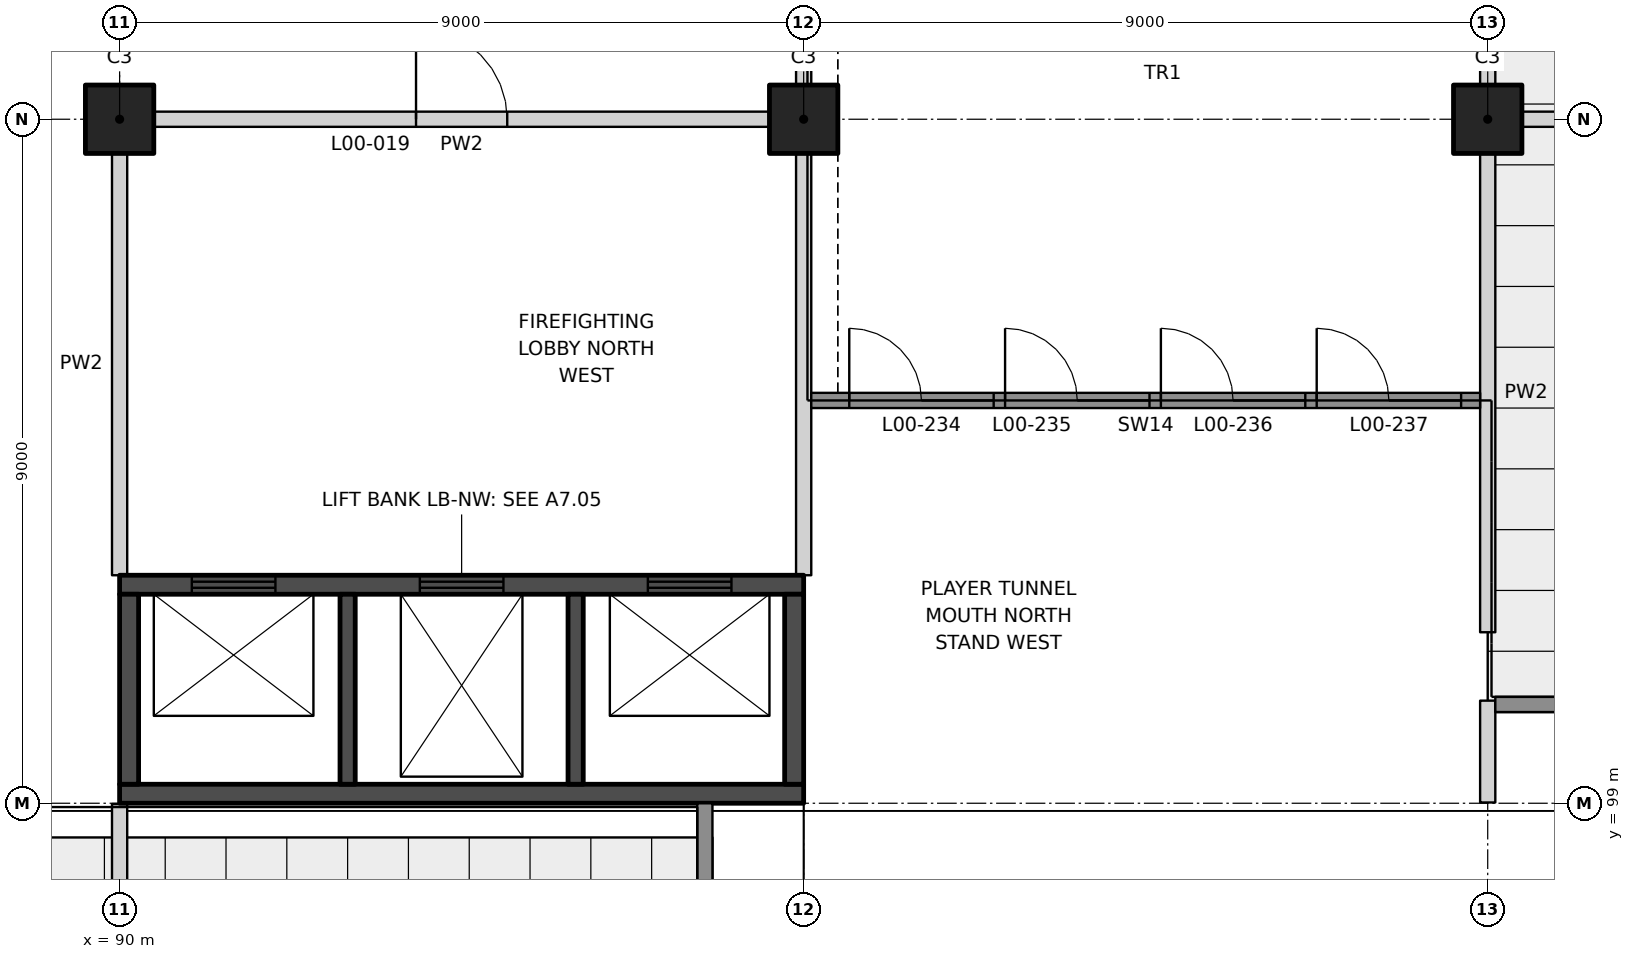
"""IFC4 building model, lengths in metres.
Left out: names, types, materials, properties, quantities, classifications, styles, units other than length and angle.
Written with IfcOpenShell. Run it as: python <this file> out.ifc"""

import sys

from ifc_helpers import new_model, si_unit, direction, frame, frame_2d, origin, origin_2d, place, context, subcontext, project, spatial, polyline, rectangle, outline, extrude, element, fill, save


model = new_model("IFC4")
c1 = context("Model", 3, precision=1e-05, world=origin(), true_north=direction((0.0, 1.0)))
c2 = subcontext(c1, "Body", "Model", "MODEL_VIEW")
j1 = project(units=[si_unit("LENGTHUNIT", "METRE"), si_unit("PLANEANGLEUNIT", "RADIAN")], contexts=[c1])
p1 = place(None, origin())
s1 = spatial("IfcSite", under=j1, at=p1, CompositionType="ELEMENT")
p2 = place(p1, origin())
s2 = spatial("IfcBuilding", under=s1, at=p2, CompositionType="ELEMENT")
p3 = place(p2, origin())
s3 = spatial("IfcBuildingStorey", under=s2, at=p3, CompositionType="ELEMENT", Elevation=0.0)
for number, where, z_axis, x_axis in (
    (1, (90.0, 108.0, 0.0), (0.0, 0.0, 1.0), (1.0, 0.0, 0.0)),
    (2, (99.0, 108.0, 0.0), (0.0, 0.0, 1.0), (1.0, 0.0, 0.0)),
):
    element("IfcColumn", number, at=place(p3, frame(where, z_axis=z_axis, x_axis=x_axis)), inside=s3, PredefinedType="COLUMN", context=c2, shape_type="SweptSolid", body=[
        extrude(rectangle(XDim=0.9, YDim=0.9, at=origin_2d()), origin(), (0.0, 0.0, 1.0), 7.0),
    ])
p4 = place(p3, frame((108.0, 108.0, 0.0), z_axis=(0.0, 0.0, 1.0), x_axis=(1.0, 0.0, 0.0)))
e3 = element("IfcColumn", 3, at=p4, inside=s3, PredefinedType="COLUMN", context=c2, shape_type="SweptSolid", body=[
    extrude(rectangle(XDim=0.9, YDim=0.9, at=origin_2d()), origin(), (0.0, 0.0, 1.0), 3.552),
])
p5 = place(p3, frame((90.45, 108.0, 0.0), z_axis=(0.0, 0.0, 1.0), x_axis=(1.0, 0.0, 0.0)))
e4 = element("IfcWall", 4, at=p5, inside=s3, PredefinedType="PARTITIONING", context=c2, shape_type="SweptSolid", body=[
    extrude(rectangle(XDim=8.1, YDim=0.2, at=frame_2d((4.05, 0.0))), origin(), (0.0, 0.0, 1.0), 5.75),
])
p6 = place(p5, frame((3.45, 0.0, 0.0)))
e5 = element("IfcOpeningElement", 5, at=p6, cuts=e4, PredefinedType="OPENING", context=c2, shape_type="SweptSolid", body=[
    extrude(rectangle(XDim=1.2, YDim=2.1, at=frame_2d((0.6, 1.05))), frame((0.0, 0.11, 0.0), z_axis=(0.0, -1.0, 0.0), x_axis=(1.0, 0.0, 0.0)), (0.0, 0.0, 1.0), 0.22),
])
p7 = place(p3, frame((108.45, 108.0, 0.0), z_axis=(0.0, 0.0, 1.0), x_axis=(1.0, 0.0, 0.0)))
e6 = element("IfcWall", 6, at=p7, inside=s3, PredefinedType="PARTITIONING", context=c2, shape_type="SweptSolid", body=[
    extrude(rectangle(XDim=8.1, YDim=0.2, at=frame_2d((4.05, 0.0))), origin(), (0.0, 0.0, 1.0), 4.445),
])
p8 = place(p3, frame((90.0, 90.45, 0.0), z_axis=(0.0, 0.0, 1.0), x_axis=(0.0, 1.0, 0.0)))
e7 = element("IfcWall", 7, at=p8, inside=s3, PredefinedType="PARTITIONING", context=c2, shape_type="SweptSolid", body=[
    extrude(rectangle(XDim=8.54, YDim=0.2, at=frame_2d((4.27, 0.0))), origin(), (0.0, 0.0, 1.0), 4.445),
])
for number, where, z_axis, x_axis in (
    (8, (90.0, 102.0, 0.0), (0.0, 0.0, 1.0), (0.0, 1.0, 0.0)),
    (9, (99.0, 102.0, 0.0), (0.0, 0.0, 1.0), (0.0, 1.0, 0.0)),
):
    element("IfcWall", number, at=place(p3, frame(where, z_axis=z_axis, x_axis=x_axis)), inside=s3, PredefinedType="PARTITIONING", context=c2, shape_type="SweptSolid", body=[
        extrude(rectangle(XDim=5.55, YDim=0.2, at=frame_2d((2.775, 0.0))), origin(), (0.0, 0.0, 1.0), 5.95),
    ])
p9 = place(p3, frame((99.0, 108.45, 0.0), z_axis=(0.0, 0.0, 1.0), x_axis=(0.0, 1.0, 0.0)))
e10 = element("IfcWall", 10, at=p9, inside=s3, PredefinedType="PARTITIONING", context=c2, shape_type="SweptSolid", body=[
    extrude(rectangle(XDim=4.979, YDim=0.2, at=frame_2d((2.49, 0.0))), origin(), (0.0, 0.0, 1.0), 3.439),
])
p10 = place(p3, frame((108.0, 99.01, 0.0), z_axis=(0.0, 0.0, 1.0), x_axis=(0.0, 1.0, 0.0)))
e11 = element("IfcWall", 11, at=p10, inside=s3, PredefinedType="PARTITIONING", context=c2, shape_type="SweptSolid", body=[
    extrude(outline(polyline([(0.0, 0.0), (1.34, 0.0), (1.34, -0.189), (0.893, 7.0), (0.0, 7.0), (0.0, 0.0)])), frame((0.0, 0.1, 0.0), z_axis=(0.0, -1.0, 0.0), x_axis=(1.0, 0.0, 0.0)), (0.0, 0.0, 1.0), 0.2),
])
p11 = place(p3, frame((108.0, 101.25, 0.0), z_axis=(0.0, 0.0, 1.0), x_axis=(0.0, 1.0, 0.0)))
e12 = element("IfcWall", 12, at=p11, inside=s3, PredefinedType="PARTITIONING", context=c2, shape_type="SweptSolid", body=[
    extrude(outline(polyline([(0.0, 0.0), (6.3, 0.0), (6.3, 3.231), (4.362, 2.311), (0.0, 0.239), (0.0, 0.0)])), frame((0.0, 0.1, 0.0), z_axis=(0.0, -1.0, 0.0), x_axis=(1.0, 0.0, 0.0)), (0.0, 0.0, 1.0), 0.2),
])
p12 = place(p3, frame((108.0, 108.45, 0.0), z_axis=(0.0, 0.0, 1.0), x_axis=(0.0, 1.0, 0.0)))
e13 = element("IfcWall", 13, at=p12, inside=s3, PredefinedType="PARTITIONING", context=c2, shape_type="SweptSolid", body=[
    extrude(rectangle(XDim=4.979, YDim=0.2, at=frame_2d((2.49, 0.0))), origin(), (0.0, 0.0, 1.0), 3.439),
])
p13 = place(p12, frame((3.125, 0.0, 0.0)))
e14 = element("IfcOpeningElement", 14, at=p13, cuts=e13, PredefinedType="OPENING", context=c2, shape_type="SweptSolid", body=[
    extrude(rectangle(XDim=1.8, YDim=2.1, at=frame_2d((0.9, 1.05))), frame((0.0, 0.11, 0.0), z_axis=(0.0, -1.0, 0.0), x_axis=(1.0, 0.0, 0.0)), (0.0, 0.0, 1.0), 0.22),
])
p14 = place(p3, frame((90.0, 101.875, 0.0), z_axis=(0.0, 0.0, 1.0), x_axis=(1.0, 0.0, 0.0)))
e15 = element("IfcWall", 15, at=p14, inside=s3, PredefinedType="SHEAR", context=c2, shape_type="SweptSolid", body=[
    extrude(rectangle(XDim=9.0, YDim=0.25, at=frame_2d((4.5, 0.0))), origin(), (0.0, 0.0, 1.0), 7.0),
])
p15 = place(p14, frame((0.95, 0.0, 0.0)))
e16 = element("IfcOpeningElement", 16, at=p15, cuts=e15, PredefinedType="OPENING", context=c2, shape_type="SweptSolid", body=[
    extrude(rectangle(XDim=1.1, YDim=2.1, at=frame_2d((0.55, 1.05))), frame((0.0, 0.135, 0.0), z_axis=(0.0, -1.0, 0.0), x_axis=(1.0, 0.0, 0.0)), (0.0, 0.0, 1.0), 0.27),
])
p16 = place(p14, frame((3.95, 0.0, 0.0)))
e17 = element("IfcOpeningElement", 17, at=p16, cuts=e15, PredefinedType="OPENING", context=c2, shape_type="SweptSolid", body=[
    extrude(rectangle(XDim=1.1, YDim=2.1, at=frame_2d((0.55, 1.05))), frame((0.0, 0.135, 0.0), z_axis=(0.0, -1.0, 0.0), x_axis=(1.0, 0.0, 0.0)), (0.0, 0.0, 1.0), 0.27),
])
p17 = place(p14, frame((6.95, 0.0, 0.0)))
e18 = element("IfcOpeningElement", 18, at=p17, cuts=e15, PredefinedType="OPENING", context=c2, shape_type="SweptSolid", body=[
    extrude(rectangle(XDim=1.1, YDim=2.1, at=frame_2d((0.55, 1.05))), frame((0.0, 0.135, 0.0), z_axis=(0.0, -1.0, 0.0), x_axis=(1.0, 0.0, 0.0)), (0.0, 0.0, 1.0), 0.27),
])
p18 = place(p3, frame((90.0, 99.125, 0.0), z_axis=(0.0, 0.0, 1.0), x_axis=(1.0, 0.0, 0.0)))
e19 = element("IfcWall", 19, at=p18, inside=s3, PredefinedType="SHEAR", context=c2, shape_type="SweptSolid", body=[
    extrude(rectangle(XDim=9.0, YDim=0.25, at=frame_2d((4.5, 0.0))), origin(), (0.0, 0.0, 1.0), 7.0),
])
for number, where, z_axis, x_axis in (
    (20, (90.125, 99.25, 0.0), (0.0, 0.0, 1.0), (0.0, 1.0, 0.0)),
    (21, (98.875, 99.25, 0.0), (0.0, 0.0, 1.0), (0.0, 1.0, 0.0)),
):
    element("IfcWall", number, at=place(p3, frame(where, z_axis=z_axis, x_axis=x_axis)), inside=s3, PredefinedType="SHEAR", context=c2, shape_type="SweptSolid", body=[
        extrude(rectangle(XDim=2.5, YDim=0.25, at=frame_2d((1.25, 0.0))), origin(), (0.0, 0.0, 1.0), 7.0),
    ])
for number, where, z_axis, x_axis in (
    (22, (93.0, 99.25, 0.0), (0.0, 0.0, 1.0), (0.0, 1.0, 0.0)),
    (23, (96.0, 99.25, 0.0), (0.0, 0.0, 1.0), (0.0, 1.0, 0.0)),
):
    element("IfcWall", number, at=place(p3, frame(where, z_axis=z_axis, x_axis=x_axis)), inside=s3, PredefinedType="SHEAR", context=c2, shape_type="SweptSolid", body=[
        extrude(rectangle(XDim=2.5, YDim=0.2, at=frame_2d((1.25, 0.0))), origin(), (0.0, 0.0, 1.0), 7.0),
    ])
p19 = place(p3, frame((99.1, 104.3, 0.0), z_axis=(0.0, 0.0, 1.0), x_axis=(1.0, 0.0, 0.0)))
e24 = element("IfcWall", 24, at=p19, inside=s3, PredefinedType="SOLIDWALL", context=c2, shape_type="SweptSolid", body=[
    extrude(rectangle(XDim=8.8, YDim=0.2, at=frame_2d((4.4, 0.0))), origin(), (0.0, 0.0, 1.0), 2.64),
])
p20 = place(p19, frame((0.5, 0.0, 0.0)))
e25 = element("IfcOpeningElement", 25, at=p20, cuts=e24, PredefinedType="OPENING", context=c2, shape_type="SweptSolid", body=[
    extrude(rectangle(XDim=1.9, YDim=2.1, at=frame_2d((0.95, 1.05))), frame((0.0, 0.11, 0.0), z_axis=(0.0, -1.0, 0.0), x_axis=(1.0, 0.0, 0.0)), (0.0, 0.0, 1.0), 0.22),
])
p21 = place(p19, frame((2.55, 0.0, 0.0)))
e26 = element("IfcOpeningElement", 26, at=p21, cuts=e24, PredefinedType="OPENING", context=c2, shape_type="SweptSolid", body=[
    extrude(rectangle(XDim=1.9, YDim=2.1, at=frame_2d((0.95, 1.05))), frame((0.0, 0.11, 0.0), z_axis=(0.0, -1.0, 0.0), x_axis=(1.0, 0.0, 0.0)), (0.0, 0.0, 1.0), 0.22),
])
p22 = place(p19, frame((4.6, 0.0, 0.0)))
e27 = element("IfcOpeningElement", 27, at=p22, cuts=e24, PredefinedType="OPENING", context=c2, shape_type="SweptSolid", body=[
    extrude(rectangle(XDim=1.9, YDim=2.1, at=frame_2d((0.95, 1.05))), frame((0.0, 0.11, 0.0), z_axis=(0.0, -1.0, 0.0), x_axis=(1.0, 0.0, 0.0)), (0.0, 0.0, 1.0), 0.22),
])
p23 = place(p19, frame((6.65, 0.0, 0.0)))
e28 = element("IfcOpeningElement", 28, at=p23, cuts=e24, PredefinedType="OPENING", context=c2, shape_type="SweptSolid", body=[
    extrude(rectangle(XDim=1.9, YDim=2.1, at=frame_2d((0.95, 1.05))), frame((0.0, 0.11, 0.0), z_axis=(0.0, -1.0, 0.0), x_axis=(1.0, 0.0, 0.0)), (0.0, 0.0, 1.0), 0.22),
])
p24 = place(p3, frame((108.1, 100.3, 0.0), z_axis=(0.0, 0.0, 1.0), x_axis=(1.0, 0.0, 0.0)))
e29 = element("IfcWall", 29, at=p24, inside=s3, PredefinedType="SOLIDWALL", context=c2, shape_type="SweptSolid", body=[
    extrude(rectangle(XDim=16.4, YDim=0.2, at=frame_2d((8.2, 0.0))), origin(), (0.0, 0.0, 1.0), 0.74),
])
p25 = place(p3, frame((97.7, 82.5, 0.0), z_axis=(0.0, 0.0, 1.0), x_axis=(0.0, 1.0, 0.0)))
e30 = element("IfcWall", 30, at=p25, inside=s3, PredefinedType="SOLIDWALL", context=c2, shape_type="SweptSolid", body=[
    extrude(rectangle(XDim=16.5, YDim=0.2, at=frame_2d((8.25, 0.0))), origin(), (0.0, 0.0, 1.0), 0.74),
])
p26 = place(p6, origin())
e31 = element("IfcDoor", 31, at=p26, inside=s3, OperationType="SINGLE_SWING_LEFT", PredefinedType="DOOR", context=c2, shape_type="SweptSolid", body=[
    extrude(rectangle(XDim=1.2, YDim=2.1, at=frame_2d((0.6, 1.05))), frame((0.0, 0.025, 0.0), z_axis=(0.0, -1.0, 0.0), x_axis=(1.0, 0.0, 0.0)), (0.0, 0.0, 1.0), 0.05),
])
fill(e5, e31)
p27 = place(p15, origin())
e32 = element("IfcDoor", 32, at=p27, inside=s3, OperationType="DOUBLE_DOOR_SLIDING", PredefinedType="DOOR", context=c2, shape_type="SweptSolid", body=[
    extrude(rectangle(XDim=1.1, YDim=2.1, at=frame_2d((0.55, 1.05))), frame((0.0, 0.025, 0.0), z_axis=(0.0, -1.0, 0.0), x_axis=(1.0, 0.0, 0.0)), (0.0, 0.0, 1.0), 0.05),
])
fill(e16, e32)
p28 = place(p16, origin())
e33 = element("IfcDoor", 33, at=p28, inside=s3, OperationType="DOUBLE_DOOR_SLIDING", PredefinedType="DOOR", context=c2, shape_type="SweptSolid", body=[
    extrude(rectangle(XDim=1.1, YDim=2.1, at=frame_2d((0.55, 1.05))), frame((0.0, 0.025, 0.0), z_axis=(0.0, -1.0, 0.0), x_axis=(1.0, 0.0, 0.0)), (0.0, 0.0, 1.0), 0.05),
])
fill(e17, e33)
p29 = place(p17, origin())
e34 = element("IfcDoor", 34, at=p29, inside=s3, OperationType="DOUBLE_DOOR_SLIDING", PredefinedType="DOOR", context=c2, shape_type="SweptSolid", body=[
    extrude(rectangle(XDim=1.1, YDim=2.1, at=frame_2d((0.55, 1.05))), frame((0.0, 0.025, 0.0), z_axis=(0.0, -1.0, 0.0), x_axis=(1.0, 0.0, 0.0)), (0.0, 0.0, 1.0), 0.05),
])
fill(e18, e34)
p30 = place(p20, origin())
e35 = element("IfcDoor", 35, at=p30, inside=s3, OperationType="DOUBLE_DOOR_SINGLE_SWING", PredefinedType="DOOR", context=c2, shape_type="SweptSolid", body=[
    extrude(rectangle(XDim=1.9, YDim=2.1, at=frame_2d((0.95, 1.05))), frame((0.0, 0.025, 0.0), z_axis=(0.0, -1.0, 0.0), x_axis=(1.0, 0.0, 0.0)), (0.0, 0.0, 1.0), 0.05),
])
fill(e25, e35)
p31 = place(p21, origin())
e36 = element("IfcDoor", 36, at=p31, inside=s3, OperationType="DOUBLE_DOOR_SINGLE_SWING", PredefinedType="DOOR", context=c2, shape_type="SweptSolid", body=[
    extrude(rectangle(XDim=1.9, YDim=2.1, at=frame_2d((0.95, 1.05))), frame((0.0, 0.025, 0.0), z_axis=(0.0, -1.0, 0.0), x_axis=(1.0, 0.0, 0.0)), (0.0, 0.0, 1.0), 0.05),
])
fill(e26, e36)
p32 = place(p22, origin())
e37 = element("IfcDoor", 37, at=p32, inside=s3, OperationType="DOUBLE_DOOR_SINGLE_SWING", PredefinedType="DOOR", context=c2, shape_type="SweptSolid", body=[
    extrude(rectangle(XDim=1.9, YDim=2.1, at=frame_2d((0.95, 1.05))), frame((0.0, 0.025, 0.0), z_axis=(0.0, -1.0, 0.0), x_axis=(1.0, 0.0, 0.0)), (0.0, 0.0, 1.0), 0.05),
])
fill(e27, e37)
p33 = place(p23, origin())
e38 = element("IfcDoor", 38, at=p33, inside=s3, OperationType="DOUBLE_DOOR_SINGLE_SWING", PredefinedType="DOOR", context=c2, shape_type="SweptSolid", body=[
    extrude(rectangle(XDim=1.9, YDim=2.1, at=frame_2d((0.95, 1.05))), frame((0.0, 0.025, 0.0), z_axis=(0.0, -1.0, 0.0), x_axis=(1.0, 0.0, 0.0)), (0.0, 0.0, 1.0), 0.05),
])
fill(e28, e38)
save(model, sys.argv[1])
